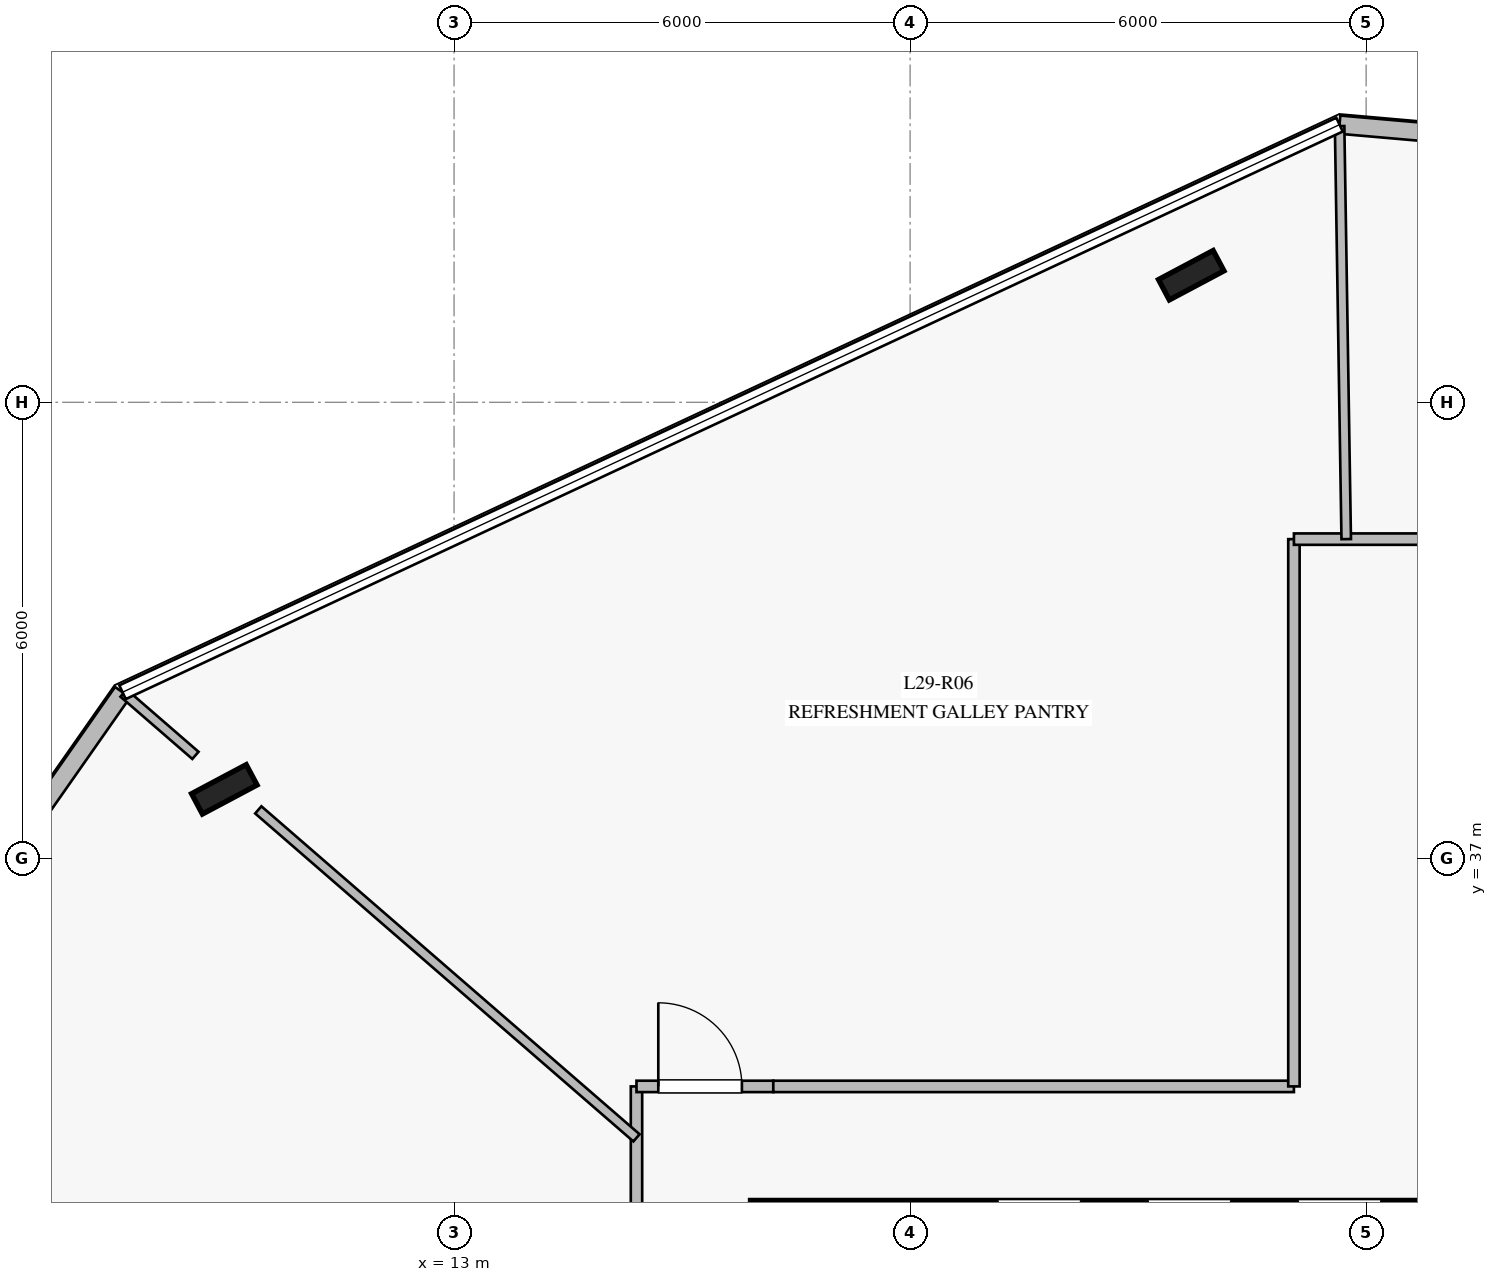
"""IFC4 building model, lengths in metres.
Left out: names, types, materials, properties, quantities, classifications, styles, units other than length and angle.
Written with IfcOpenShell. Run it as: python <this file> out.ifc"""

import sys

from ifc_helpers import new_model, si_unit, direction, frame, frame_2d, origin, origin_2d, place, context, subcontext, project, spatial, rectangle, i_section, extrude, element, fill, save


model = new_model("IFC4")
c1 = context("Model", 3, precision=1e-05, world=origin(), true_north=direction((0.0, 1.0)))
c2 = subcontext(c1, "Body", "Model", "MODEL_VIEW")
j1 = project(units=[si_unit("LENGTHUNIT", "METRE"), si_unit("PLANEANGLEUNIT", "RADIAN")], contexts=[c1])
p1 = place(None, origin())
s1 = spatial("IfcSite", under=j1, at=p1, CompositionType="ELEMENT")
p2 = place(p1, origin())
s2 = spatial("IfcBuilding", under=s1, at=p2, CompositionType="ELEMENT")
p3 = place(p2, frame((0.0, 0.0, 122.4)))
s3 = spatial("IfcBuildingStorey", under=s2, at=p3, CompositionType="ELEMENT", Elevation=122.4)
p4 = place(p3, frame((33.1, 32.2, 0.0), z_axis=(0.0, 0.0, 1.0), x_axis=(-1.0, 0.0, 0.0)))
e1 = element("IfcWall", 1, at=p4, inside=s3, PredefinedType="SHEAR", context=c2, shape_type="SweptSolid", body=[
    extrude(rectangle(XDim=16.2, YDim=0.6, at=frame_2d((8.1, 0.0))), origin(), (0.0, 0.0, 1.0), 3.76),
])
p5 = place(p4, frame((5.05, 0.0, 0.0)))
e2 = element("IfcOpeningElement", 2, at=p5, cuts=e1, PredefinedType="OPENING", context=c2, shape_type="SweptSolid", body=[
    extrude(rectangle(XDim=1.2, YDim=2.25, at=frame_2d((0.6, 1.125))), frame((0.0, 0.31, 0.0), z_axis=(0.0, -1.0, 0.0), x_axis=(1.0, 0.0, 0.0)), (0.0, 0.0, 1.0), 0.62),
])
p6 = place(p4, frame((11.85, 0.0, 0.0)))
e3 = element("IfcOpeningElement", 3, at=p6, cuts=e1, PredefinedType="OPENING", context=c2, shape_type="SweptSolid", body=[
    extrude(rectangle(XDim=1.1, YDim=2.2, at=frame_2d((0.55, 1.1))), frame((0.0, 0.31, 0.0), z_axis=(0.0, -1.0, 0.0), x_axis=(1.0, 0.0, 0.0)), (0.0, 0.0, 1.0), 0.62),
])
p7 = place(p4, frame((9.875, 0.0, 0.0)))
e4 = element("IfcOpeningElement", 4, at=p7, cuts=e1, PredefinedType="OPENING", context=c2, shape_type="SweptSolid", body=[
    extrude(rectangle(XDim=1.1, YDim=2.2, at=frame_2d((0.55, 1.1))), frame((0.0, 0.31, 0.0), z_axis=(0.0, -1.0, 0.0), x_axis=(1.0, 0.0, 0.0)), (0.0, 0.0, 1.0), 0.62),
])
p8 = place(p4, frame((7.9, 0.0, 0.0)))
e5 = element("IfcOpeningElement", 5, at=p8, cuts=e1, PredefinedType="OPENING", context=c2, shape_type="SweptSolid", body=[
    extrude(rectangle(XDim=1.1, YDim=2.2, at=frame_2d((0.55, 1.1))), frame((0.0, 0.31, 0.0), z_axis=(0.0, -1.0, 0.0), x_axis=(1.0, 0.0, 0.0)), (0.0, 0.0, 1.0), 0.62),
])
for number, where, z_axis, x_axis in (
    (6, (17.2, 32.2, 0.0), (0.0, 0.0, 1.0), (1.0, 0.0, 0.0)),
    (7, (22.699, 44.672, 0.0), (0.0, 0.0, 1.0), (0.883, 0.469, 0.0)),
    (8, (9.977, 37.908, 0.0), (0.0, 0.0, 1.0), (0.883, 0.469, 0.0)),
):
    element("IfcColumn", number, at=place(p3, frame(where, z_axis=z_axis, x_axis=x_axis)), inside=s3, PredefinedType="COLUMN", context=c2, shape_type="SweptSolid", body=[
        extrude(i_section(OverallWidth=0.303, OverallDepth=0.814, WebThickness=0.021, FlangeThickness=0.04, at=origin_2d()), origin(), (0.0, 0.0, 1.0), 4.0),
    ])
p9 = place(p3, frame((29.104, 46.264, 0.0), z_axis=(0.0, 0.0, 1.0), x_axis=(-0.996204852099, 0.087039603938, 0.0)))
e9 = element("IfcWall", 9, at=p9, inside=s3, PredefinedType="STANDARD", context=c2, shape_type="SweptSolid", body=[
    extrude(rectangle(XDim=4.471, YDim=0.24, at=frame_2d((2.236, 0.0))), origin(), (0.0, 0.0, 1.0), 3.76),
])
p10 = place(p3, frame((8.638, 39.186, 0.0), z_axis=(0.0, 0.0, 1.0), x_axis=(-0.57368221041, -0.819077970317, 0.0)))
e10 = element("IfcWall", 10, at=p10, inside=s3, PredefinedType="STANDARD", context=c2, shape_type="SweptSolid", body=[
    extrude(rectangle(XDim=4.471, YDim=0.24, at=frame_2d((2.235, 0.0))), origin(), (0.0, 0.0, 1.0), 3.76),
])
p11 = place(p3, frame((15.4, 32.2, 0.0), z_axis=(0.0, 0.0, 1.0), x_axis=(0.0, 1.0, 0.0)))
e11 = element("IfcWall", 11, at=p11, inside=s3, PredefinedType="PARTITIONING", context=c2, shape_type="SweptSolid", body=[
    extrude(rectangle(XDim=1.8, YDim=0.15, at=frame_2d((0.9, 0.0))), origin(), (0.0, 0.0, 1.0), 3.21),
])
p12 = place(p3, frame((15.4, 34.0, 0.0), z_axis=(0.0, 0.0, 1.0), x_axis=(1.0, 0.0, 0.0)))
e12 = element("IfcWall", 12, at=p12, inside=s3, PredefinedType="PARTITIONING", context=c2, shape_type="SweptSolid", body=[
    extrude(rectangle(XDim=1.8, YDim=0.15, at=frame_2d((0.9, 0.0))), origin(), (0.0, 0.0, 1.0), 3.76),
])
p13 = place(p12, frame((0.287, 0.0, 0.0)))
e13 = element("IfcOpeningElement", 13, at=p13, cuts=e12, PredefinedType="OPENING", context=c2, shape_type="SweptSolid", body=[
    extrude(rectangle(XDim=1.1, YDim=2.2, at=frame_2d((0.55, 1.1))), frame((0.0, 0.085, 0.0), z_axis=(0.0, -1.0, 0.0), x_axis=(1.0, 0.0, 0.0)), (0.0, 0.0, 1.0), 0.17),
])
p14 = place(p3, frame((17.2, 34.0, 0.0), z_axis=(0.0, 0.0, 1.0), x_axis=(1.0, 0.0, 0.0)))
e14 = element("IfcWall", 14, at=p14, inside=s3, PredefinedType="PARTITIONING", context=c2, shape_type="SweptSolid", body=[
    extrude(rectangle(XDim=6.85, YDim=0.15, at=frame_2d((3.425, 0.0))), origin(), (0.0, 0.0, 1.0), 3.21),
])
p15 = place(p3, frame((24.05, 34.0, 0.0), z_axis=(0.0, 0.0, 1.0), x_axis=(0.0, 1.0, 0.0)))
e15 = element("IfcWall", 15, at=p15, inside=s3, PredefinedType="PARTITIONING", context=c2, shape_type="SweptSolid", body=[
    extrude(rectangle(XDim=7.2, YDim=0.15, at=frame_2d((3.6, 0.0))), origin(), (0.0, 0.0, 1.0), 3.36),
])
p16 = place(p3, frame((24.05, 41.2, 0.0), z_axis=(0.0, 0.0, 1.0), x_axis=(1.0, 0.0, 0.0)))
e16 = element("IfcWall", 16, at=p16, inside=s3, PredefinedType="PARTITIONING", context=c2, shape_type="SweptSolid", body=[
    extrude(rectangle(XDim=1.9, YDim=0.15, at=frame_2d((0.95, 0.0))), origin(), (0.0, 0.0, 1.0), 3.76),
])
p17 = place(p3, frame((24.738, 41.2, 0.0), z_axis=(0.0, 0.0, 1.0), x_axis=(-0.016037114242, 0.999871397214, 0.0)))
e17 = element("IfcWall", 17, at=p17, inside=s3, PredefinedType="PARTITIONING", context=c2, shape_type="SweptSolid", body=[
    extrude(rectangle(XDim=5.435, YDim=0.125, at=frame_2d((2.717, 0.0))), origin(), (0.0, 0.0, 1.0), 3.16),
])
p18 = place(p3, frame((15.4, 33.323, 0.0), z_axis=(0.0, 0.0, 1.0), x_axis=(-0.755497026954, 0.655152075677, 0.0)))
e18 = element("IfcWall", 18, at=p18, inside=s3, PredefinedType="PARTITIONING", context=c2, shape_type="SweptSolid", body=[
    extrude(rectangle(XDim=6.586, YDim=0.125, at=frame_2d((3.293, 0.0))), origin(), (0.0, 0.0, 1.0), 3.21),
])
p19 = place(p3, frame((9.597, 38.355, 0.0), z_axis=(0.0, 0.0, 1.0), x_axis=(-0.755592443886, 0.655042028226, 0.0)))
e19 = element("IfcWall", 19, at=p19, inside=s3, PredefinedType="PARTITIONING", context=c2, shape_type="SweptSolid", body=[
    extrude(rectangle(XDim=1.25, YDim=0.125, at=frame_2d((0.625, 0.0))), origin(), (0.0, 0.0, 1.0), 3.76),
])
p20 = place(p13, origin())
e20 = element("IfcDoor", 20, at=p20, inside=s3, OperationType="SINGLE_SWING_LEFT", PredefinedType="DOOR", context=c2, shape_type="SweptSolid", body=[
    extrude(rectangle(XDim=1.1, YDim=2.2, at=frame_2d((0.55, 1.1))), frame((0.0, 0.025, 0.0), z_axis=(0.0, -1.0, 0.0), x_axis=(1.0, 0.0, 0.0)), (0.0, 0.0, 1.0), 0.05),
])
fill(e13, e20)
save(model, sys.argv[1])
